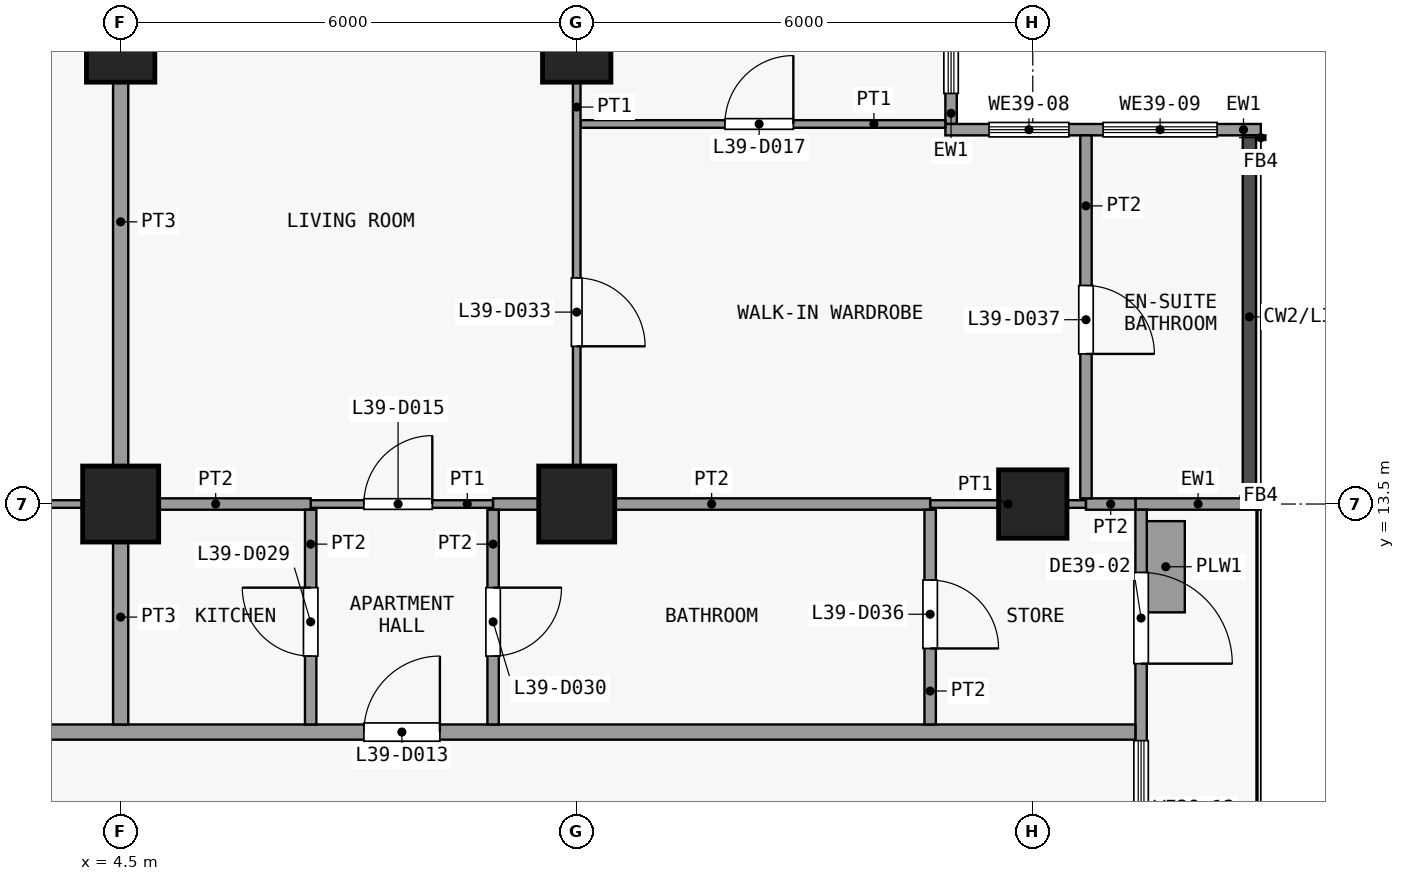
"""IFC4 building model, lengths in metres.
Left out: names, types, materials, properties, quantities, classifications, styles, units other than length and angle.
Written with IfcOpenShell. Run it as: python <this file> out.ifc"""

import sys

from ifc_helpers import new_model, si_unit, direction, frame, frame_2d, origin, origin_2d, place, context, subcontext, project, spatial, rectangle, extrude, element, fill, save


model = new_model("IFC4")
c1 = context("Model", 3, precision=1e-05, world=origin(), true_north=direction((0.0, 1.0)))
c2 = subcontext(c1, "Body", "Model", "MODEL_VIEW")
j1 = project(units=[si_unit("LENGTHUNIT", "METRE"), si_unit("PLANEANGLEUNIT", "RADIAN")], contexts=[c1])
p1 = place(None, origin())
s1 = spatial("IfcSite", under=j1, at=p1, CompositionType="ELEMENT")
p2 = place(p1, origin())
s2 = spatial("IfcBuilding", under=s1, at=p2, CompositionType="ELEMENT")
p3 = place(p2, frame((0.0, 0.0, 160.1)))
s3 = spatial("IfcBuildingStorey", under=s2, at=p3, CompositionType="ELEMENT", Elevation=160.1)
p4 = place(p3, frame((4.5, 13.5, 0.0), z_axis=(0.0, 0.0, 1.0), x_axis=(1.0, 0.0, 0.0)))
e1 = element("IfcColumn", 1, at=p4, inside=s3, PredefinedType="COLUMN", context=c2, shape_type="SweptSolid", body=[
    extrude(rectangle(XDim=1.0, YDim=1.0, at=origin_2d()), origin(), (0.0, 0.0, 1.0), 3.6),
])
p5 = place(p3, frame((4.5, 19.5, 0.0), z_axis=(0.0, 0.0, 1.0), x_axis=(1.0, 0.0, 0.0)))
e2 = element("IfcColumn", 2, at=p5, inside=s3, PredefinedType="COLUMN", context=c2, shape_type="SweptSolid", body=[
    extrude(rectangle(XDim=0.9, YDim=0.9, at=origin_2d()), origin(), (0.0, 0.0, 1.0), 3.6),
])
p6 = place(p3, frame((10.5, 13.5, 0.0), z_axis=(0.0, 0.0, 1.0), x_axis=(1.0, 0.0, 0.0)))
e3 = element("IfcColumn", 3, at=p6, inside=s3, PredefinedType="COLUMN", context=c2, shape_type="SweptSolid", body=[
    extrude(rectangle(XDim=1.0, YDim=1.0, at=origin_2d()), origin(), (0.0, 0.0, 1.0), 3.6),
])
for number, where, z_axis, x_axis in (
    (4, (10.5, 19.5, 0.0), (0.0, 0.0, 1.0), (1.0, 0.0, 0.0)),
    (5, (16.5, 13.5, 0.0), (0.0, 0.0, 1.0), (1.0, 0.0, 0.0)),
):
    element("IfcColumn", number, at=place(p3, frame(where, z_axis=z_axis, x_axis=x_axis)), inside=s3, PredefinedType="COLUMN", context=c2, shape_type="SweptSolid", body=[
        extrude(rectangle(XDim=0.9, YDim=0.9, at=origin_2d()), origin(), (0.0, 0.0, 1.0), 3.6),
    ])
p7 = place(p3, frame((15.425, 22.262, 0.0), z_axis=(0.0, 0.0, 1.0), x_axis=(0.0, -1.0, 0.0)))
e6 = element("IfcWall", 6, at=p7, inside=s3, PredefinedType="SOLIDWALL", context=c2, shape_type="SweptSolid", body=[
    extrude(rectangle(XDim=3.762, YDim=0.15, at=frame_2d((1.881, 0.0))), origin(), (0.0, 0.0, 1.0), 3.3),
])
p8 = place(p7, frame((0.401, 0.0, 0.9)))
e7 = element("IfcOpeningElement", 7, at=p8, cuts=e6, PredefinedType="OPENING", context=c2, shape_type="SweptSolid", body=[
    extrude(rectangle(XDim=2.96, YDim=2.4, at=frame_2d((1.48, 1.2))), frame((0.0, 0.085, 0.0), z_axis=(0.0, -1.0, 0.0), x_axis=(1.0, 0.0, 0.0)), (0.0, 0.0, 1.0), 0.17),
])
p9 = place(p3, frame((15.35, 18.425, 0.0), z_axis=(0.0, 0.0, 1.0), x_axis=(1.0, 0.0, 0.0)))
e8 = element("IfcWall", 8, at=p9, inside=s3, PredefinedType="SOLIDWALL", context=c2, shape_type="SweptSolid", body=[
    extrude(rectangle(XDim=4.15, YDim=0.15, at=frame_2d((2.075, 0.0))), origin(), (0.0, 0.0, 1.0), 3.3),
])
p10 = place(p9, frame((0.575, 0.0, 0.9)))
e9 = element("IfcOpeningElement", 9, at=p10, cuts=e8, PredefinedType="OPENING", context=c2, shape_type="SweptSolid", body=[
    extrude(rectangle(XDim=1.05, YDim=2.4, at=frame_2d((0.525, 1.2))), frame((0.0, 0.085, 0.0), z_axis=(0.0, -1.0, 0.0), x_axis=(1.0, 0.0, 0.0)), (0.0, 0.0, 1.0), 0.17),
])
p11 = place(p9, frame((2.075, 0.0, 0.9)))
e10 = element("IfcOpeningElement", 10, at=p11, cuts=e8, PredefinedType="OPENING", context=c2, shape_type="SweptSolid", body=[
    extrude(rectangle(XDim=1.5, YDim=2.4, at=frame_2d((0.75, 1.2))), frame((0.0, 0.085, 0.0), z_axis=(0.0, -1.0, 0.0), x_axis=(1.0, 0.0, 0.0)), (0.0, 0.0, 1.0), 0.17),
])
p12 = place(p3, frame((17.85, 13.5, 0.0), z_axis=(0.0, 0.0, 1.0), x_axis=(1.0, 0.0, 0.0)))
e11 = element("IfcWall", 11, at=p12, inside=s3, PredefinedType="SOLIDWALL", context=c2, shape_type="SweptSolid", body=[
    extrude(rectangle(XDim=1.65, YDim=0.15, at=frame_2d((0.825, 0.0))), origin(), (0.0, 0.0, 1.0), 3.3),
])
p13 = place(p3, frame((17.925, 13.425, 0.0), z_axis=(0.0, 0.0, 1.0), x_axis=(0.0, -1.0, 0.0)))
e12 = element("IfcWall", 12, at=p13, inside=s3, PredefinedType="SOLIDWALL", context=c2, shape_type="SweptSolid", body=[
    extrude(rectangle(XDim=5.85, YDim=0.15, at=frame_2d((2.925, 0.0))), origin(), (0.0, 0.0, 1.0), 3.3),
])
p14 = place(p13, frame((0.825, 0.0, 0.0)))
e13 = element("IfcOpeningElement", 13, at=p14, cuts=e12, PredefinedType="OPENING", context=c2, shape_type="SweptSolid", body=[
    extrude(rectangle(XDim=1.2, YDim=2.4, at=frame_2d((0.6, 1.2))), frame((0.0, 0.085, 0.0), z_axis=(0.0, -1.0, 0.0), x_axis=(1.0, 0.0, 0.0)), (0.0, 0.0, 1.0), 0.17),
])
p15 = place(p13, frame((3.038, 0.0, 0.9)))
e14 = element("IfcOpeningElement", 14, at=p15, cuts=e12, PredefinedType="OPENING", context=c2, shape_type="SweptSolid", body=[
    extrude(rectangle(XDim=1.8, YDim=2.1, at=frame_2d((0.9, 1.05))), frame((0.0, 0.085, 0.0), z_axis=(0.0, -1.0, 0.0), x_axis=(1.0, 0.0, 0.0)), (0.0, 0.0, 1.0), 0.17),
])
p16 = place(p3, frame((18.25, 12.075, 0.0), z_axis=(0.0, 0.0, 1.0), x_axis=(0.0, 1.0, 0.0)))
e15 = element("IfcWall", 15, at=p16, inside=s3, PredefinedType="USERDEFINED", context=c2, shape_type="SweptSolid", body=[
    extrude(rectangle(XDim=1.2, YDim=0.5, at=frame_2d((0.6, 0.0))), origin(), (0.0, 0.0, 1.0), 0.9),
])
p17 = place(p3, frame((-19.35, 10.5, 0.0), z_axis=(0.0, 0.0, 1.0), x_axis=(1.0, 0.0, 0.0)))
e16 = element("IfcWall", 16, at=p17, inside=s3, PredefinedType="PARTITIONING", context=c2, shape_type="SweptSolid", body=[
    extrude(rectangle(XDim=37.2, YDim=0.2, at=frame_2d((18.6, 0.0))), origin(), (0.0, 0.0, 1.0), 3.3),
])
p18 = place(p17, frame((7.05, 0.0, 0.0)))
e17 = element("IfcOpeningElement", 17, at=p18, cuts=e16, PredefinedType="OPENING", context=c2, shape_type="SweptSolid", body=[
    extrude(rectangle(XDim=1.0, YDim=2.1, at=frame_2d((0.5, 1.05))), frame((0.0, 0.11, 0.0), z_axis=(0.0, -1.0, 0.0), x_axis=(1.0, 0.0, 0.0)), (0.0, 0.0, 1.0), 0.22),
])
p19 = place(p17, frame((27.05, 0.0, 0.0)))
e18 = element("IfcOpeningElement", 18, at=p19, cuts=e16, PredefinedType="OPENING", context=c2, shape_type="SweptSolid", body=[
    extrude(rectangle(XDim=1.0, YDim=2.1, at=frame_2d((0.5, 1.05))), frame((0.0, 0.11, 0.0), z_axis=(0.0, -1.0, 0.0), x_axis=(1.0, 0.0, 0.0)), (0.0, 0.0, 1.0), 0.22),
])
p20 = place(p3, frame((-3.1, 13.5, 0.0), z_axis=(0.0, 0.0, 1.0), x_axis=(1.0, 0.0, 0.0)))
e19 = element("IfcWall", 19, at=p20, inside=s3, PredefinedType="PARTITIONING", context=c2, shape_type="SweptSolid", body=[
    extrude(rectangle(XDim=7.6, YDim=0.1, at=frame_2d((3.8, 0.0))), origin(), (0.0, 0.0, 1.0), 3.3),
])
p21 = place(p3, frame((7.0, 13.5, 0.0), z_axis=(0.0, 0.0, 1.0), x_axis=(1.0, 0.0, 0.0)))
e20 = element("IfcWall", 20, at=p21, inside=s3, PredefinedType="PARTITIONING", context=c2, shape_type="SweptSolid", body=[
    extrude(rectangle(XDim=2.4, YDim=0.1, at=frame_2d((1.2, 0.0))), origin(), (0.0, 0.0, 1.0), 3.3),
])
p22 = place(p21, frame((0.7, 0.0, 0.0)))
e21 = element("IfcOpeningElement", 21, at=p22, cuts=e20, PredefinedType="OPENING", context=c2, shape_type="SweptSolid", body=[
    extrude(rectangle(XDim=0.9, YDim=2.1, at=frame_2d((0.45, 1.05))), frame((0.0, 0.06, 0.0), z_axis=(0.0, -1.0, 0.0), x_axis=(1.0, 0.0, 0.0)), (0.0, 0.0, 1.0), 0.12),
])
p23 = place(p3, frame((15.15, 13.5, 0.0), z_axis=(0.0, 0.0, 1.0), x_axis=(1.0, 0.0, 0.0)))
e22 = element("IfcWall", 22, at=p23, inside=s3, PredefinedType="PARTITIONING", context=c2, shape_type="SweptSolid", body=[
    extrude(rectangle(XDim=2.05, YDim=0.1, at=frame_2d((1.025, 0.0))), origin(), (0.0, 0.0, 1.0), 3.3),
])
p24 = place(p3, frame((4.5, 13.5, 0.0), z_axis=(0.0, 0.0, 1.0), x_axis=(1.0, 0.0, 0.0)))
e23 = element("IfcWall", 23, at=p24, inside=s3, PredefinedType="PARTITIONING", context=c2, shape_type="SweptSolid", body=[
    extrude(rectangle(XDim=2.5, YDim=0.15, at=frame_2d((1.25, 0.0))), origin(), (0.0, 0.0, 1.0), 3.3),
])
p25 = place(p3, frame((9.4, 13.5, 0.0), z_axis=(0.0, 0.0, 1.0), x_axis=(1.0, 0.0, 0.0)))
e24 = element("IfcWall", 24, at=p25, inside=s3, PredefinedType="PARTITIONING", context=c2, shape_type="SweptSolid", body=[
    extrude(rectangle(XDim=5.75, YDim=0.15, at=frame_2d((2.875, 0.0))), origin(), (0.0, 0.0, 1.0), 3.3),
])
p26 = place(p3, frame((17.2, 13.5, 0.0), z_axis=(0.0, 0.0, 1.0), x_axis=(1.0, 0.0, 0.0)))
e25 = element("IfcWall", 25, at=p26, inside=s3, PredefinedType="PARTITIONING", context=c2, shape_type="SweptSolid", body=[
    extrude(rectangle(XDim=0.65, YDim=0.15, at=frame_2d((0.325, 0.0))), origin(), (0.0, 0.0, 1.0), 3.3),
])
p27 = place(p3, frame((10.55, 18.5, 0.0), z_axis=(0.0, 0.0, 1.0), x_axis=(1.0, 0.0, 0.0)))
e26 = element("IfcWall", 26, at=p27, inside=s3, PredefinedType="PARTITIONING", context=c2, shape_type="SweptSolid", body=[
    extrude(rectangle(XDim=4.8, YDim=0.1, at=frame_2d((2.4, 0.0))), origin(), (0.0, 0.0, 1.0), 3.3),
])
p28 = place(p27, frame((1.9, 0.0, 0.0)))
e27 = element("IfcOpeningElement", 27, at=p28, cuts=e26, PredefinedType="OPENING", context=c2, shape_type="SweptSolid", body=[
    extrude(rectangle(XDim=0.9, YDim=2.1, at=frame_2d((0.45, 1.05))), frame((0.0, 0.06, 0.0), z_axis=(0.0, -1.0, 0.0), x_axis=(1.0, 0.0, 0.0)), (0.0, 0.0, 1.0), 0.12),
])
p29 = place(p3, frame((4.5, 10.6, 0.0), z_axis=(0.0, 0.0, 1.0), x_axis=(0.0, 1.0, 0.0)))
e28 = element("IfcWall", 28, at=p29, inside=s3, PredefinedType="PARTITIONING", context=c2, shape_type="SweptSolid", body=[
    extrude(rectangle(XDim=2.825, YDim=0.2, at=frame_2d((1.413, 0.0))), origin(), (0.0, 0.0, 1.0), 3.3),
])
p30 = place(p3, frame((4.5, 13.575, 0.0), z_axis=(0.0, 0.0, 1.0), x_axis=(0.0, 1.0, 0.0)))
e29 = element("IfcWall", 29, at=p30, inside=s3, PredefinedType="PARTITIONING", context=c2, shape_type="SweptSolid", body=[
    extrude(rectangle(XDim=7.275, YDim=0.2, at=frame_2d((3.638, 0.0))), origin(), (0.0, 0.0, 1.0), 3.3),
])
p31 = place(p3, frame((7.0, 10.6, 0.0), z_axis=(0.0, 0.0, 1.0), x_axis=(0.0, 1.0, 0.0)))
e30 = element("IfcWall", 30, at=p31, inside=s3, PredefinedType="PARTITIONING", context=c2, shape_type="SweptSolid", body=[
    extrude(rectangle(XDim=2.825, YDim=0.15, at=frame_2d((1.413, 0.0))), origin(), (0.0, 0.0, 1.0), 3.3),
])
p32 = place(p31, frame((0.9, 0.0, 0.0)))
e31 = element("IfcOpeningElement", 31, at=p32, cuts=e30, PredefinedType="OPENING", context=c2, shape_type="SweptSolid", body=[
    extrude(rectangle(XDim=0.9, YDim=2.1, at=frame_2d((0.45, 1.05))), frame((0.0, 0.085, 0.0), z_axis=(0.0, -1.0, 0.0), x_axis=(1.0, 0.0, 0.0)), (0.0, 0.0, 1.0), 0.17),
])
p33 = place(p3, frame((9.4, 10.6, 0.0), z_axis=(0.0, 0.0, 1.0), x_axis=(0.0, 1.0, 0.0)))
e32 = element("IfcWall", 32, at=p33, inside=s3, PredefinedType="PARTITIONING", context=c2, shape_type="SweptSolid", body=[
    extrude(rectangle(XDim=2.825, YDim=0.15, at=frame_2d((1.413, 0.0))), origin(), (0.0, 0.0, 1.0), 3.3),
])
p34 = place(p33, frame((0.9, 0.0, 0.0)))
e33 = element("IfcOpeningElement", 33, at=p34, cuts=e32, PredefinedType="OPENING", context=c2, shape_type="SweptSolid", body=[
    extrude(rectangle(XDim=0.9, YDim=2.1, at=frame_2d((0.45, 1.05))), frame((0.0, 0.085, 0.0), z_axis=(0.0, -1.0, 0.0), x_axis=(1.0, 0.0, 0.0)), (0.0, 0.0, 1.0), 0.17),
])
p35 = place(p3, frame((10.5, 13.575, 0.0), z_axis=(0.0, 0.0, 1.0), x_axis=(0.0, 1.0, 0.0)))
e34 = element("IfcWall", 34, at=p35, inside=s3, PredefinedType="PARTITIONING", context=c2, shape_type="SweptSolid", body=[
    extrude(rectangle(XDim=7.275, YDim=0.1, at=frame_2d((3.638, 0.0))), origin(), (0.0, 0.0, 1.0), 3.3),
])
p36 = place(p35, frame((2.0, 0.0, 0.0)))
e35 = element("IfcOpeningElement", 35, at=p36, cuts=e34, PredefinedType="OPENING", context=c2, shape_type="SweptSolid", body=[
    extrude(rectangle(XDim=0.9, YDim=2.1, at=frame_2d((0.45, 1.05))), frame((0.0, 0.06, 0.0), z_axis=(0.0, -1.0, 0.0), x_axis=(1.0, 0.0, 0.0)), (0.0, 0.0, 1.0), 0.12),
])
p37 = place(p3, frame((15.15, 10.6, 0.0), z_axis=(0.0, 0.0, 1.0), x_axis=(0.0, 1.0, 0.0)))
e36 = element("IfcWall", 36, at=p37, inside=s3, PredefinedType="PARTITIONING", context=c2, shape_type="SweptSolid", body=[
    extrude(rectangle(XDim=2.825, YDim=0.15, at=frame_2d((1.413, 0.0))), origin(), (0.0, 0.0, 1.0), 3.3),
])
p38 = place(p37, frame((1.0, 0.0, 0.0)))
e37 = element("IfcOpeningElement", 37, at=p38, cuts=e36, PredefinedType="OPENING", context=c2, shape_type="SweptSolid", body=[
    extrude(rectangle(XDim=0.9, YDim=2.1, at=frame_2d((0.45, 1.05))), frame((0.0, 0.085, 0.0), z_axis=(0.0, -1.0, 0.0), x_axis=(1.0, 0.0, 0.0)), (0.0, 0.0, 1.0), 0.17),
])
p39 = place(p3, frame((17.2, 13.575, 0.0), z_axis=(0.0, 0.0, 1.0), x_axis=(0.0, 1.0, 0.0)))
e38 = element("IfcWall", 38, at=p39, inside=s3, PredefinedType="PARTITIONING", context=c2, shape_type="SweptSolid", body=[
    extrude(rectangle(XDim=4.775, YDim=0.15, at=frame_2d((2.388, 0.0))), origin(), (0.0, 0.0, 1.0), 3.3),
])
p40 = place(p39, frame((1.9, 0.0, 0.0)))
e39 = element("IfcOpeningElement", 39, at=p40, cuts=e38, PredefinedType="OPENING", context=c2, shape_type="SweptSolid", body=[
    extrude(rectangle(XDim=0.9, YDim=2.1, at=frame_2d((0.45, 1.05))), frame((0.0, 0.085, 0.0), z_axis=(0.0, -1.0, 0.0), x_axis=(1.0, 0.0, 0.0)), (0.0, 0.0, 1.0), 0.17),
])
p41 = place(p8, origin())
e40 = element("IfcWindow", 40, at=p41, inside=s3, PartitioningType="SINGLE_PANEL", PredefinedType="WINDOW", context=c2, shape_type="SweptSolid", body=[
    extrude(rectangle(XDim=2.96, YDim=2.4, at=frame_2d((1.48, 1.2))), frame((0.0, 0.03, 0.0), z_axis=(0.0, -1.0, 0.0), x_axis=(1.0, 0.0, 0.0)), (0.0, 0.0, 1.0), 0.06),
])
fill(e7, e40)
p42 = place(p10, origin())
e41 = element("IfcWindow", 41, at=p42, inside=s3, PartitioningType="SINGLE_PANEL", PredefinedType="WINDOW", context=c2, shape_type="SweptSolid", body=[
    extrude(rectangle(XDim=1.05, YDim=2.4, at=frame_2d((0.525, 1.2))), frame((0.0, 0.03, 0.0), z_axis=(0.0, -1.0, 0.0), x_axis=(1.0, 0.0, 0.0)), (0.0, 0.0, 1.0), 0.06),
])
fill(e9, e41)
p43 = place(p11, origin())
e42 = element("IfcWindow", 42, at=p43, inside=s3, PartitioningType="SINGLE_PANEL", PredefinedType="WINDOW", context=c2, shape_type="SweptSolid", body=[
    extrude(rectangle(XDim=1.5, YDim=2.4, at=frame_2d((0.75, 1.2))), frame((0.0, 0.03, 0.0), z_axis=(0.0, -1.0, 0.0), x_axis=(1.0, 0.0, 0.0)), (0.0, 0.0, 1.0), 0.06),
])
fill(e10, e42)
p44 = place(p14, origin())
e43 = element("IfcDoor", 43, at=p44, inside=s3, OperationType="SINGLE_SWING_RIGHT", PredefinedType="DOOR", context=c2, shape_type="SweptSolid", body=[
    extrude(rectangle(XDim=1.2, YDim=2.4, at=frame_2d((0.6, 1.2))), frame((0.0, 0.025, 0.0), z_axis=(0.0, -1.0, 0.0), x_axis=(1.0, 0.0, 0.0)), (0.0, 0.0, 1.0), 0.05),
])
fill(e13, e43)
p45 = place(p15, origin())
e44 = element("IfcWindow", 44, at=p45, inside=s3, PartitioningType="SINGLE_PANEL", PredefinedType="WINDOW", context=c2, shape_type="SweptSolid", body=[
    extrude(rectangle(XDim=1.8, YDim=2.1, at=frame_2d((0.9, 1.05))), frame((0.0, 0.03, 0.0), z_axis=(0.0, -1.0, 0.0), x_axis=(1.0, 0.0, 0.0)), (0.0, 0.0, 1.0), 0.06),
])
fill(e14, e44)
p46 = place(p19, origin())
e45 = element("IfcDoor", 45, at=p46, inside=s3, OperationType="SINGLE_SWING_LEFT", PredefinedType="DOOR", context=c2, shape_type="SweptSolid", body=[
    extrude(rectangle(XDim=1.0, YDim=2.1, at=frame_2d((0.5, 1.05))), frame((0.0, 0.025, 0.0), z_axis=(0.0, -1.0, 0.0), x_axis=(1.0, 0.0, 0.0)), (0.0, 0.0, 1.0), 0.05),
])
fill(e18, e45)
p47 = place(p22, origin())
e46 = element("IfcDoor", 46, at=p47, inside=s3, OperationType="SINGLE_SWING_LEFT", PredefinedType="DOOR", context=c2, shape_type="SweptSolid", body=[
    extrude(rectangle(XDim=0.9, YDim=2.1, at=frame_2d((0.45, 1.05))), frame((0.0, 0.025, 0.0), z_axis=(0.0, -1.0, 0.0), x_axis=(1.0, 0.0, 0.0)), (0.0, 0.0, 1.0), 0.05),
])
fill(e21, e46)
p48 = place(p28, origin())
e47 = element("IfcDoor", 47, at=p48, inside=s3, OperationType="SINGLE_SWING_LEFT", PredefinedType="DOOR", context=c2, shape_type="SweptSolid", body=[
    extrude(rectangle(XDim=0.9, YDim=2.1, at=frame_2d((0.45, 1.05))), frame((0.0, 0.025, 0.0), z_axis=(0.0, -1.0, 0.0), x_axis=(1.0, 0.0, 0.0)), (0.0, 0.0, 1.0), 0.05),
])
fill(e27, e47)
p49 = place(p32, origin())
e48 = element("IfcDoor", 48, at=p49, inside=s3, OperationType="SINGLE_SWING_LEFT", PredefinedType="DOOR", context=c2, shape_type="SweptSolid", body=[
    extrude(rectangle(XDim=0.9, YDim=2.1, at=frame_2d((0.45, 1.05))), frame((0.0, 0.025, 0.0), z_axis=(0.0, -1.0, 0.0), x_axis=(1.0, 0.0, 0.0)), (0.0, 0.0, 1.0), 0.05),
])
fill(e31, e48)
p50 = place(p34, origin())
e49 = element("IfcDoor", 49, at=p50, inside=s3, OperationType="SINGLE_SWING_RIGHT", PredefinedType="DOOR", context=c2, shape_type="SweptSolid", body=[
    extrude(rectangle(XDim=0.9, YDim=2.1, at=frame_2d((0.45, 1.05))), frame((0.0, 0.025, 0.0), z_axis=(0.0, -1.0, 0.0), x_axis=(1.0, 0.0, 0.0)), (0.0, 0.0, 1.0), 0.05),
])
fill(e33, e49)
p51 = place(p36, origin())
e50 = element("IfcDoor", 50, at=p51, inside=s3, OperationType="SINGLE_SWING_LEFT", PredefinedType="DOOR", context=c2, shape_type="SweptSolid", body=[
    extrude(rectangle(XDim=0.9, YDim=2.1, at=frame_2d((0.45, 1.05))), frame((0.0, 0.025, 0.0), z_axis=(0.0, -1.0, 0.0), x_axis=(1.0, 0.0, 0.0)), (0.0, 0.0, 1.0), 0.05),
])
fill(e35, e50)
p52 = place(p38, origin())
e51 = element("IfcDoor", 51, at=p52, inside=s3, OperationType="SINGLE_SWING_LEFT", PredefinedType="DOOR", context=c2, shape_type="SweptSolid", body=[
    extrude(rectangle(XDim=0.9, YDim=2.1, at=frame_2d((0.45, 1.05))), frame((0.0, 0.025, 0.0), z_axis=(0.0, -1.0, 0.0), x_axis=(1.0, 0.0, 0.0)), (0.0, 0.0, 1.0), 0.05),
])
fill(e37, e51)
p53 = place(p40, origin())
e52 = element("IfcDoor", 52, at=p53, inside=s3, OperationType="SINGLE_SWING_LEFT", PredefinedType="DOOR", context=c2, shape_type="SweptSolid", body=[
    extrude(rectangle(XDim=0.9, YDim=2.1, at=frame_2d((0.45, 1.05))), frame((0.0, 0.025, 0.0), z_axis=(0.0, -1.0, 0.0), x_axis=(1.0, 0.0, 0.0)), (0.0, 0.0, 1.0), 0.05),
])
fill(e39, e52)
save(model, sys.argv[1])
